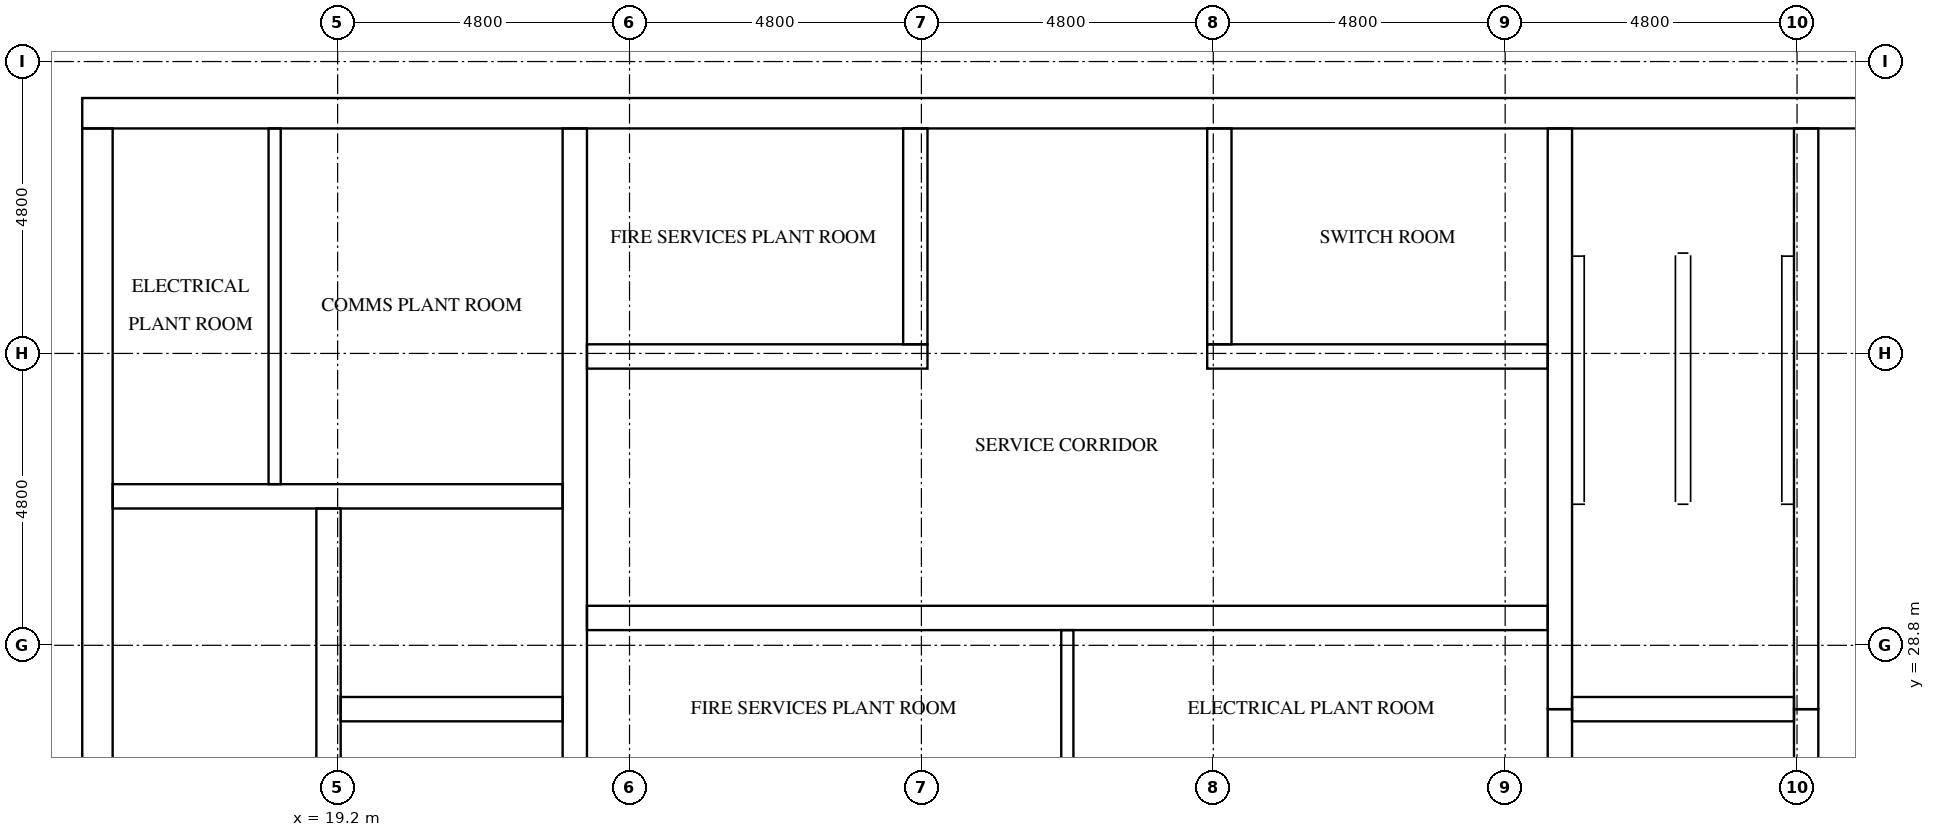
"""IFC4 building model, lengths in metres.
Left out: names, types, materials, properties, quantities, classifications, styles, units other than length and angle.
Written with IfcOpenShell. Run it as: python <this file> out.ifc"""

import sys

from ifc_helpers import new_model, si_unit, direction, frame, frame_2d, origin, place, context, subcontext, project, spatial, rectangle, extrude, element, fill, save


model = new_model("IFC4")
c1 = context("Model", 3, precision=1e-05, world=origin(), true_north=direction((0.0, 1.0)))
c2 = subcontext(c1, "Body", "Model", "MODEL_VIEW")
j1 = project(units=[si_unit("LENGTHUNIT", "METRE"), si_unit("PLANEANGLEUNIT", "RADIAN")], contexts=[c1])
p1 = place(None, origin())
s1 = spatial("IfcSite", under=j1, at=p1, CompositionType="ELEMENT")
p2 = place(p1, origin())
s2 = spatial("IfcBuilding", under=s1, at=p2, CompositionType="ELEMENT")
p3 = place(p2, frame((0.0, 0.0, 301.1)))
s3 = spatial("IfcBuildingStorey", under=s2, at=p3, CompositionType="ELEMENT", Elevation=301.1)
p4 = place(p3, frame((15.0, 37.55, 0.0), z_axis=(0.0, 0.0, 1.0), x_axis=(1.0, 0.0, 0.0)))
e1 = element("IfcWall", 1, at=p4, inside=s3, PredefinedType="SHEAR", context=c2, shape_type="SweptSolid", body=[
    extrude(rectangle(XDim=32.4, YDim=0.5, at=frame_2d((16.2, 0.0))), origin(), (0.0, 0.0, 1.0), 4.4),
])
p5 = place(p4, frame((15.3, 0.0, 0.0)))
e2 = element("IfcOpeningElement", 2, at=p5, cuts=e1, PredefinedType="OPENING", context=c2, shape_type="SweptSolid", body=[
    extrude(rectangle(XDim=1.8, YDim=2.1, at=frame_2d((0.9, 1.05))), frame((0.0, 0.26, 0.0), z_axis=(0.0, -1.0, 0.0), x_axis=(1.0, 0.0, 0.0)), (0.0, 0.0, 1.0), 0.52),
])
p6 = place(p4, frame((1.282, 0.0, 0.0)))
e3 = element("IfcOpeningElement", 3, at=p6, cuts=e1, PredefinedType="OPENING", context=c2, shape_type="SweptSolid", body=[
    extrude(rectangle(XDim=1.0, YDim=2.1, at=frame_2d((0.5, 1.05))), frame((0.0, 0.26, 0.0), z_axis=(0.0, -1.0, 0.0), x_axis=(1.0, 0.0, 0.0)), (0.0, 0.0, 1.0), 0.52),
])
p7 = place(p4, frame((5.082, 0.0, 0.0)))
e4 = element("IfcOpeningElement", 4, at=p7, cuts=e1, PredefinedType="OPENING", context=c2, shape_type="SweptSolid", body=[
    extrude(rectangle(XDim=1.0, YDim=2.1, at=frame_2d((0.5, 1.05))), frame((0.0, 0.26, 0.0), z_axis=(0.0, -1.0, 0.0), x_axis=(1.0, 0.0, 0.0)), (0.0, 0.0, 1.0), 0.52),
])
p8 = place(p3, frame((15.25, 15.5, 0.0), z_axis=(0.0, 0.0, 1.0), x_axis=(0.0, 1.0, 0.0)))
e5 = element("IfcWall", 5, at=p8, inside=s3, PredefinedType="SHEAR", context=c2, shape_type="SweptSolid", body=[
    extrude(rectangle(XDim=21.8, YDim=0.5, at=frame_2d((10.9, 0.0))), origin(), (0.0, 0.0, 1.0), 4.4),
])
p9 = place(p8, frame((5.26, 0.0, 0.0)))
e6 = element("IfcOpeningElement", 6, at=p9, cuts=e5, PredefinedType="OPENING", context=c2, shape_type="SweptSolid", body=[
    extrude(rectangle(XDim=1.2, YDim=2.1, at=frame_2d((0.6, 1.05))), frame((0.0, 0.26, 0.0), z_axis=(0.0, -1.0, 0.0), x_axis=(1.0, 0.0, 0.0)), (0.0, 0.0, 1.0), 0.52),
])
p10 = place(p3, frame((19.05, 15.5, 0.0), z_axis=(0.0, 0.0, 1.0), x_axis=(0.0, 1.0, 0.0)))
e7 = element("IfcWall", 7, at=p10, inside=s3, PredefinedType="SHEAR", context=c2, shape_type="SweptSolid", body=[
    extrude(rectangle(XDim=15.55, YDim=0.4, at=frame_2d((7.775, 0.0))), origin(), (0.0, 0.0, 1.0), 4.4),
])
p11 = place(p10, frame((9.95, 0.0, 0.0)))
e8 = element("IfcOpeningElement", 8, at=p11, cuts=e7, PredefinedType="OPENING", context=c2, shape_type="SweptSolid", body=[
    extrude(rectangle(XDim=1.1, YDim=2.1, at=frame_2d((0.55, 1.05))), frame((0.0, 0.21, 0.0), z_axis=(0.0, -1.0, 0.0), x_axis=(1.0, 0.0, 0.0)), (0.0, 0.0, 1.0), 0.42),
])
p12 = place(p10, frame((13.45, 0.0, 0.0)))
e9 = element("IfcOpeningElement", 9, at=p12, cuts=e7, PredefinedType="OPENING", context=c2, shape_type="SweptSolid", body=[
    extrude(rectangle(XDim=1.1, YDim=2.1, at=frame_2d((0.55, 1.05))), frame((0.0, 0.21, 0.0), z_axis=(0.0, -1.0, 0.0), x_axis=(1.0, 0.0, 0.0)), (0.0, 0.0, 1.0), 0.42),
])
p13 = place(p10, frame((0.7, 0.0, 0.0)))
e10 = element("IfcOpeningElement", 10, at=p13, cuts=e7, PredefinedType="OPENING", context=c2, shape_type="SweptSolid", body=[
    extrude(rectangle(XDim=1.2, YDim=2.1, at=frame_2d((0.6, 1.05))), frame((0.0, 0.21, 0.0), z_axis=(0.0, -1.0, 0.0), x_axis=(1.0, 0.0, 0.0)), (0.0, 0.0, 1.0), 0.42),
])
p14 = place(p3, frame((23.1, 15.5, 0.0), z_axis=(0.0, 0.0, 1.0), x_axis=(0.0, 1.0, 0.0)))
e11 = element("IfcWall", 11, at=p14, inside=s3, PredefinedType="SHEAR", context=c2, shape_type="SweptSolid", body=[
    extrude(rectangle(XDim=21.8, YDim=0.4, at=frame_2d((10.9, 0.0))), origin(), (0.0, 0.0, 1.0), 4.4),
])
p15 = place(p3, frame((39.3, 24.25, 0.0), z_axis=(0.0, 0.0, 1.0), x_axis=(0.0, 1.0, 0.0)))
e12 = element("IfcWall", 12, at=p15, inside=s3, PredefinedType="SHEAR", context=c2, shape_type="SweptSolid", body=[
    extrude(rectangle(XDim=3.5, YDim=0.4, at=frame_2d((1.75, 0.0))), origin(), (0.0, 0.0, 1.0), 4.4),
])
p16 = place(p3, frame((39.3, 27.75, 0.0), z_axis=(0.0, 0.0, 1.0), x_axis=(0.0, 1.0, 0.0)))
e13 = element("IfcWall", 13, at=p16, inside=s3, PredefinedType="SHEAR", context=c2, shape_type="SweptSolid", body=[
    extrude(rectangle(XDim=9.55, YDim=0.4, at=frame_2d((4.775, 0.0))), origin(), (0.0, 0.0, 1.0), 4.4),
])
p17 = place(p3, frame((43.35, 24.25, 0.0), z_axis=(0.0, 0.0, 1.0), x_axis=(0.0, 1.0, 0.0)))
e14 = element("IfcWall", 14, at=p17, inside=s3, PredefinedType="SHEAR", context=c2, shape_type="SweptSolid", body=[
    extrude(rectangle(XDim=3.5, YDim=0.4, at=frame_2d((1.75, 0.0))), origin(), (0.0, 0.0, 1.0), 4.4),
])
p18 = place(p17, frame((1.2, 0.0, 0.0)))
e15 = element("IfcOpeningElement", 15, at=p18, cuts=e14, PredefinedType="OPENING", context=c2, shape_type="SweptSolid", body=[
    extrude(rectangle(XDim=1.1, YDim=2.1, at=frame_2d((0.55, 1.05))), frame((0.0, 0.21, 0.0), z_axis=(0.0, -1.0, 0.0), x_axis=(1.0, 0.0, 0.0)), (0.0, 0.0, 1.0), 0.42),
])
p19 = place(p3, frame((43.35, 27.75, 0.0), z_axis=(0.0, 0.0, 1.0), x_axis=(0.0, 1.0, 0.0)))
e16 = element("IfcWall", 16, at=p19, inside=s3, PredefinedType="SHEAR", context=c2, shape_type="SweptSolid", body=[
    extrude(rectangle(XDim=9.55, YDim=0.4, at=frame_2d((4.775, 0.0))), origin(), (0.0, 0.0, 1.0), 4.4),
])
p20 = place(p19, frame((7.65, 0.0, 0.0)))
e17 = element("IfcOpeningElement", 17, at=p20, cuts=e16, PredefinedType="OPENING", context=c2, shape_type="SweptSolid", body=[
    extrude(rectangle(XDim=1.2, YDim=2.1, at=frame_2d((0.6, 1.05))), frame((0.0, 0.21, 0.0), z_axis=(0.0, -1.0, 0.0), x_axis=(1.0, 0.0, 0.0)), (0.0, 0.0, 1.0), 0.42),
])
p21 = place(p3, frame((19.25, 27.75, 0.0), z_axis=(0.0, 0.0, 1.0), x_axis=(1.0, 0.0, 0.0)))
e18 = element("IfcWall", 18, at=p21, inside=s3, PredefinedType="SHEAR", context=c2, shape_type="SweptSolid", body=[
    extrude(rectangle(XDim=3.65, YDim=0.4, at=frame_2d((1.825, 0.0))), origin(), (0.0, 0.0, 1.0), 4.4),
])
p22 = place(p3, frame((15.5, 31.25, 0.0), z_axis=(0.0, 0.0, 1.0), x_axis=(1.0, 0.0, 0.0)))
e19 = element("IfcWall", 19, at=p22, inside=s3, PredefinedType="SHEAR", context=c2, shape_type="SweptSolid", body=[
    extrude(rectangle(XDim=7.4, YDim=0.4, at=frame_2d((3.7, 0.0))), origin(), (0.0, 0.0, 1.0), 4.4),
])
p23 = place(p3, frame((39.5, 27.75, 0.0), z_axis=(0.0, 0.0, 1.0), x_axis=(1.0, 0.0, 0.0)))
e20 = element("IfcWall", 20, at=p23, inside=s3, PredefinedType="SHEAR", context=c2, shape_type="SweptSolid", body=[
    extrude(rectangle(XDim=3.65, YDim=0.4, at=frame_2d((1.825, 0.0))), origin(), (0.0, 0.0, 1.0), 4.4),
])
p24 = place(p3, frame((23.3, 29.25, 0.0), z_axis=(0.0, 0.0, 1.0), x_axis=(1.0, 0.0, 0.0)))
e21 = element("IfcWall", 21, at=p24, inside=s3, PredefinedType="SHEAR", context=c2, shape_type="SweptSolid", body=[
    extrude(rectangle(XDim=15.8, YDim=0.4, at=frame_2d((7.9, 0.0))), origin(), (0.0, 0.0, 1.0), 4.4),
])
p25 = place(p24, frame((3.4, 0.0, 0.0)))
e22 = element("IfcOpeningElement", 22, at=p25, cuts=e21, PredefinedType="OPENING", context=c2, shape_type="SweptSolid", body=[
    extrude(rectangle(XDim=1.0, YDim=2.1, at=frame_2d((0.5, 1.05))), frame((0.0, 0.21, 0.0), z_axis=(0.0, -1.0, 0.0), x_axis=(1.0, 0.0, 0.0)), (0.0, 0.0, 1.0), 0.42),
])
p26 = place(p24, frame((11.4, 0.0, 0.0)))
e23 = element("IfcOpeningElement", 23, at=p26, cuts=e21, PredefinedType="OPENING", context=c2, shape_type="SweptSolid", body=[
    extrude(rectangle(XDim=1.0, YDim=2.1, at=frame_2d((0.5, 1.05))), frame((0.0, 0.21, 0.0), z_axis=(0.0, -1.0, 0.0), x_axis=(1.0, 0.0, 0.0)), (0.0, 0.0, 1.0), 0.42),
])
p27 = place(p3, frame((23.3, 33.55, 0.0), z_axis=(0.0, 0.0, 1.0), x_axis=(1.0, 0.0, 0.0)))
e24 = element("IfcWall", 24, at=p27, inside=s3, PredefinedType="SHEAR", context=c2, shape_type="SweptSolid", body=[
    extrude(rectangle(XDim=5.6, YDim=0.4, at=frame_2d((2.8, 0.0))), origin(), (0.0, 0.0, 1.0), 4.4),
])
p28 = place(p27, frame((2.1, 0.0, 0.0)))
e25 = element("IfcOpeningElement", 25, at=p28, cuts=e24, PredefinedType="OPENING", context=c2, shape_type="SweptSolid", body=[
    extrude(rectangle(XDim=1.0, YDim=2.1, at=frame_2d((0.5, 1.05))), frame((0.0, 0.21, 0.0), z_axis=(0.0, -1.0, 0.0), x_axis=(1.0, 0.0, 0.0)), (0.0, 0.0, 1.0), 0.42),
])
p29 = place(p3, frame((33.5, 33.55, 0.0), z_axis=(0.0, 0.0, 1.0), x_axis=(1.0, 0.0, 0.0)))
e26 = element("IfcWall", 26, at=p29, inside=s3, PredefinedType="SHEAR", context=c2, shape_type="SweptSolid", body=[
    extrude(rectangle(XDim=5.6, YDim=0.4, at=frame_2d((2.8, 0.0))), origin(), (0.0, 0.0, 1.0), 4.4),
])
p30 = place(p29, frame((2.5, 0.0, 0.0)))
e27 = element("IfcOpeningElement", 27, at=p30, cuts=e26, PredefinedType="OPENING", context=c2, shape_type="SweptSolid", body=[
    extrude(rectangle(XDim=1.0, YDim=2.1, at=frame_2d((0.5, 1.05))), frame((0.0, 0.21, 0.0), z_axis=(0.0, -1.0, 0.0), x_axis=(1.0, 0.0, 0.0)), (0.0, 0.0, 1.0), 0.42),
])
for number, where, z_axis, x_axis in (
    (28, (28.7, 33.75, 0.0), (0.0, 0.0, 1.0), (0.0, 1.0, 0.0)),
    (29, (33.7, 33.75, 0.0), (0.0, 0.0, 1.0), (0.0, 1.0, 0.0)),
):
    element("IfcWall", number, at=place(p3, frame(where, z_axis=z_axis, x_axis=x_axis)), inside=s3, PredefinedType="SHEAR", context=c2, shape_type="SweptSolid", body=[
        extrude(rectangle(XDim=3.55, YDim=0.4, at=frame_2d((1.775, 0.0))), origin(), (0.0, 0.0, 1.0), 4.4),
    ])
p31 = place(p3, frame((18.164, 31.45, 0.0), z_axis=(0.0, 0.0, 1.0), x_axis=(0.0, 1.0, 0.0)))
e30 = element("IfcWall", 30, at=p31, inside=s3, PredefinedType="PARTITIONING", context=c2, shape_type="SweptSolid", body=[
    extrude(rectangle(XDim=5.85, YDim=0.2, at=frame_2d((2.925, 0.0))), origin(), (0.0, 0.0, 1.0), 4.4),
])
p32 = place(p3, frame((31.2, 26.35, 0.0), z_axis=(0.0, 0.0, 1.0), x_axis=(0.0, 1.0, 0.0)))
e31 = element("IfcWall", 31, at=p32, inside=s3, PredefinedType="PARTITIONING", context=c2, shape_type="SweptSolid", body=[
    extrude(rectangle(XDim=2.7, YDim=0.2, at=frame_2d((1.35, 0.0))), origin(), (0.0, 0.0, 1.0), 4.4),
])
p33 = place(p12, origin())
e32 = element("IfcDoor", 32, at=p33, inside=s3, OperationType="DOUBLE_DOOR_SLIDING", PredefinedType="DOOR", context=c2, shape_type="SweptSolid", body=[
    extrude(rectangle(XDim=1.1, YDim=2.1, at=frame_2d((0.55, 1.05))), frame((0.0, 0.025, 0.0), z_axis=(0.0, -1.0, 0.0), x_axis=(1.0, 0.0, 0.0)), (0.0, 0.0, 1.0), 0.05),
])
fill(e9, e32)
p34 = place(p20, origin())
e33 = element("IfcDoor", 33, at=p34, inside=s3, OperationType="SINGLE_SWING_RIGHT", PredefinedType="DOOR", context=c2, shape_type="SweptSolid", body=[
    extrude(rectangle(XDim=1.2, YDim=2.1, at=frame_2d((0.6, 1.05))), frame((0.0, 0.025, 0.0), z_axis=(0.0, -1.0, 0.0), x_axis=(1.0, 0.0, 0.0)), (0.0, 0.0, 1.0), 0.05),
])
fill(e17, e33)
p35 = place(p5, origin())
e34 = element("IfcDoor", 34, at=p35, inside=s3, OperationType="DOUBLE_DOOR_SINGLE_SWING", PredefinedType="DOOR", context=c2, shape_type="SweptSolid", body=[
    extrude(rectangle(XDim=1.8, YDim=2.1, at=frame_2d((0.9, 1.05))), frame((0.0, 0.025, 0.0), z_axis=(0.0, -1.0, 0.0), x_axis=(1.0, 0.0, 0.0)), (0.0, 0.0, 1.0), 0.05),
])
fill(e2, e34)
p36 = place(p6, origin())
e35 = element("IfcDoor", 35, at=p36, inside=s3, OperationType="SINGLE_SWING_LEFT", PredefinedType="DOOR", context=c2, shape_type="SweptSolid", body=[
    extrude(rectangle(XDim=1.0, YDim=2.1, at=frame_2d((0.5, 1.05))), frame((0.0, 0.025, 0.0), z_axis=(0.0, -1.0, 0.0), x_axis=(1.0, 0.0, 0.0)), (0.0, 0.0, 1.0), 0.05),
])
fill(e3, e35)
p37 = place(p7, origin())
e36 = element("IfcDoor", 36, at=p37, inside=s3, OperationType="SINGLE_SWING_RIGHT", PredefinedType="DOOR", context=c2, shape_type="SweptSolid", body=[
    extrude(rectangle(XDim=1.0, YDim=2.1, at=frame_2d((0.5, 1.05))), frame((0.0, 0.025, 0.0), z_axis=(0.0, -1.0, 0.0), x_axis=(1.0, 0.0, 0.0)), (0.0, 0.0, 1.0), 0.05),
])
fill(e4, e36)
p38 = place(p25, origin())
e37 = element("IfcDoor", 37, at=p38, inside=s3, OperationType="SINGLE_SWING_LEFT", PredefinedType="DOOR", context=c2, shape_type="SweptSolid", body=[
    extrude(rectangle(XDim=1.0, YDim=2.1, at=frame_2d((0.5, 1.05))), frame((0.0, 0.025, 0.0), z_axis=(0.0, -1.0, 0.0), x_axis=(1.0, 0.0, 0.0)), (0.0, 0.0, 1.0), 0.05),
])
fill(e22, e37)
p39 = place(p26, origin())
e38 = element("IfcDoor", 38, at=p39, inside=s3, OperationType="SINGLE_SWING_RIGHT", PredefinedType="DOOR", context=c2, shape_type="SweptSolid", body=[
    extrude(rectangle(XDim=1.0, YDim=2.1, at=frame_2d((0.5, 1.05))), frame((0.0, 0.025, 0.0), z_axis=(0.0, -1.0, 0.0), x_axis=(1.0, 0.0, 0.0)), (0.0, 0.0, 1.0), 0.05),
])
fill(e23, e38)
p40 = place(p28, frame((1.0, 0.0, 0.0), z_axis=(0.0, 0.0, 1.0), x_axis=(-1.0, 0.0, 0.0)))
e39 = element("IfcDoor", 39, at=p40, inside=s3, OperationType="SINGLE_SWING_LEFT", PredefinedType="DOOR", context=c2, shape_type="SweptSolid", body=[
    extrude(rectangle(XDim=1.0, YDim=2.1, at=frame_2d((0.5, 1.05))), frame((0.0, 0.025, 0.0), z_axis=(0.0, -1.0, 0.0), x_axis=(1.0, 0.0, 0.0)), (0.0, 0.0, 1.0), 0.05),
])
fill(e25, e39)
p41 = place(p30, frame((1.0, 0.0, 0.0), z_axis=(0.0, 0.0, 1.0), x_axis=(-1.0, 0.0, 0.0)))
e40 = element("IfcDoor", 40, at=p41, inside=s3, OperationType="SINGLE_SWING_RIGHT", PredefinedType="DOOR", context=c2, shape_type="SweptSolid", body=[
    extrude(rectangle(XDim=1.0, YDim=2.1, at=frame_2d((0.5, 1.05))), frame((0.0, 0.025, 0.0), z_axis=(0.0, -1.0, 0.0), x_axis=(1.0, 0.0, 0.0)), (0.0, 0.0, 1.0), 0.05),
])
fill(e27, e40)
save(model, sys.argv[1])
